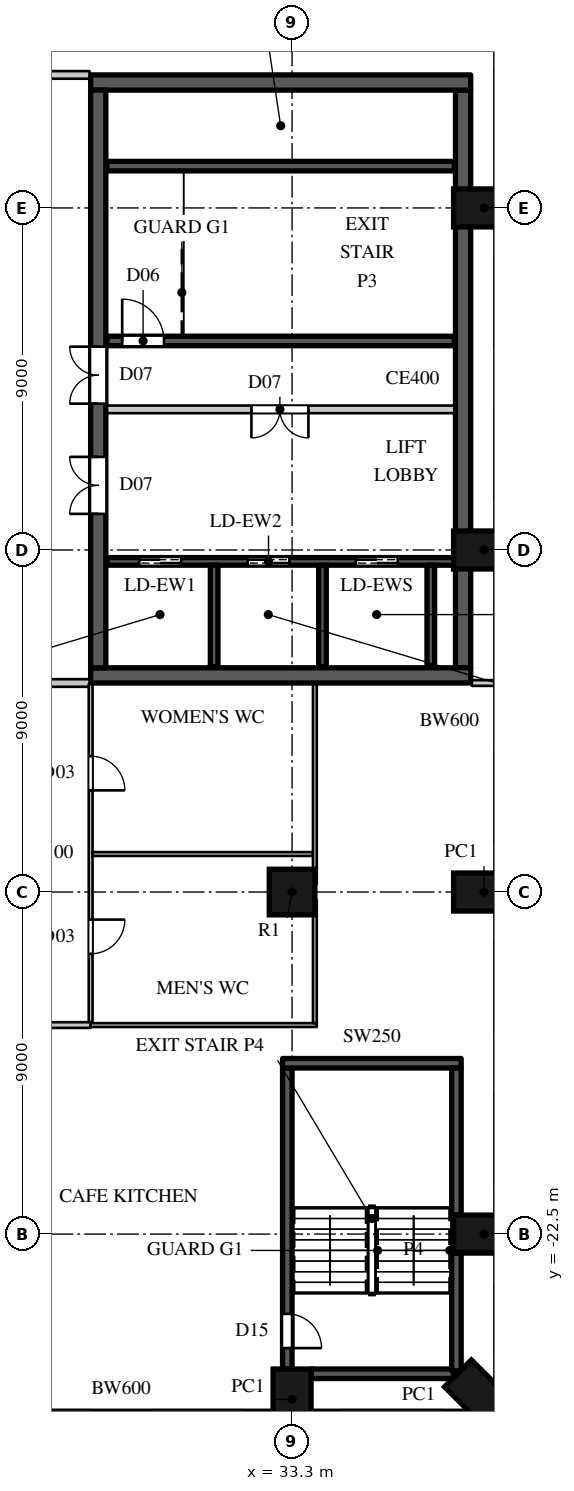
"""IFC4 building model, lengths in metres.
Left out: names, types, materials, properties, quantities, classifications, styles, units other than length and angle.
Written with IfcOpenShell. Run it as: python <this file> out.ifc"""

import sys

from ifc_helpers import new_model, si_unit, direction, frame, frame_2d, origin, origin_2d, place, context, subcontext, project, spatial, rectangle, circle, extrude, element, fill, save


model = new_model("IFC4")
c1 = context("Model", 3, precision=1e-05, world=origin(), true_north=direction((0.0, 1.0)))
c2 = subcontext(c1, "Body", "Model", "MODEL_VIEW")
j1 = project(units=[si_unit("LENGTHUNIT", "METRE"), si_unit("PLANEANGLEUNIT", "RADIAN")], contexts=[c1])
p1 = place(None, origin())
s1 = spatial("IfcSite", under=j1, at=p1, CompositionType="ELEMENT")
p2 = place(p1, origin())
s2 = spatial("IfcBuilding", under=s1, at=p2, CompositionType="ELEMENT")
p3 = place(p2, frame((0.0, 0.0, 44.0)))
s3 = spatial("IfcBuildingStorey", under=s2, at=p3, CompositionType="ELEMENT", Elevation=44.0)
for number, where, z_axis, x_axis in (
    (1, (33.3, -26.85, 0.0), (0.0, 0.0, 1.0), (1.0, 0.0, 0.0)),
    (2, (38.231, -26.731, 0.0), (0.0, 0.0, 1.0), (0.707, 0.707, 0.0)),
    (3, (38.35, -22.5, 0.0), (0.0, 0.0, 1.0), (0.0, 1.0, 0.0)),
    (4, (38.35, -13.5, 0.0), (0.0, 0.0, 1.0), (0.0, 1.0, 0.0)),
    (5, (38.35, -4.5, 0.0), (0.0, 0.0, 1.0), (0.0, 1.0, 0.0)),
    (6, (38.35, 4.5, 0.0), (0.0, 0.0, 1.0), (0.0, 1.0, 0.0)),
):
    element("IfcColumn", number, at=place(p3, frame(where, z_axis=z_axis, x_axis=x_axis)), inside=s3, PredefinedType="COLUMN", context=c2, shape_type="SweptSolid", body=[
        extrude(rectangle(XDim=1.0, YDim=1.6, at=origin_2d()), origin(), (0.0, 0.0, 1.0), 6.0),
    ])
p4 = place(p3, frame((33.3, -13.5, 0.0), z_axis=(0.0, 0.0, 1.0), x_axis=(1.0, 0.0, 0.0)))
e7 = element("IfcColumn", 7, at=p4, inside=s3, PredefinedType="COLUMN", context=c2, shape_type="SweptSolid", body=[
    extrude(circle(Radius=0.6, at=origin_2d()), origin(), (0.0, 0.0, 1.0), 6.0),
])
p5 = place(p3, frame((24.8, -27.425, 0.0), z_axis=(0.0, 0.0, 1.0), x_axis=(1.0, 0.0, 0.0)))
e8 = element("IfcWall", 8, at=p5, inside=s3, PredefinedType="ELEMENTEDWALL", context=c2, shape_type="SweptSolid", body=[
    extrude(rectangle(XDim=8.0, YDim=0.6, at=frame_2d((4.0, 0.0))), origin(), (0.0, 0.0, 1.0), 5.596),
])
p6 = place(p5, frame((0.8, 0.0, 1.2)))
e9 = element("IfcOpeningElement", 9, at=p6, cuts=e8, PredefinedType="OPENING", context=c2, shape_type="SweptSolid", body=[
    extrude(rectangle(XDim=2.4, YDim=2.4, at=frame_2d((1.2, 1.2))), frame((0.0, 0.31, 0.0), z_axis=(0.0, -1.0, 0.0), x_axis=(1.0, 0.0, 0.0)), (0.0, 0.0, 1.0), 0.62),
])
p7 = place(p5, frame((4.8, 0.0, 1.2)))
e10 = element("IfcOpeningElement", 10, at=p7, cuts=e8, PredefinedType="OPENING", context=c2, shape_type="SweptSolid", body=[
    extrude(rectangle(XDim=2.4, YDim=2.4, at=frame_2d((1.2, 1.2))), frame((0.0, 0.31, 0.0), z_axis=(0.0, -1.0, 0.0), x_axis=(1.0, 0.0, 0.0)), (0.0, 0.0, 1.0), 0.62),
])
p8 = place(p3, frame((33.8, -27.425, 0.0), z_axis=(0.0, 0.0, 1.0), x_axis=(1.0, 0.0, 0.0)))
e11 = element("IfcWall", 11, at=p8, inside=s3, PredefinedType="ELEMENTEDWALL", context=c2, shape_type="SweptSolid", body=[
    extrude(rectangle(XDim=4.193, YDim=0.6, at=frame_2d((2.096, 0.0))), origin(), (0.0, 0.0, 1.0), 5.596),
])
p9 = place(p8, frame((0.746, 0.0, 1.2)))
e12 = element("IfcOpeningElement", 12, at=p9, cuts=e11, PredefinedType="OPENING", context=c2, shape_type="SweptSolid", body=[
    extrude(rectangle(XDim=2.7, YDim=2.4, at=frame_2d((1.35, 1.2))), frame((0.0, 0.31, 0.0), z_axis=(0.0, -1.0, 0.0), x_axis=(1.0, 0.0, 0.0)), (0.0, 0.0, 1.0), 0.62),
])
for number, where, z_axis, x_axis in (
    (13, (28.0, 7.8, 0.0), (0.0, 0.0, 1.0), (1.0, 0.0, 0.0)),
    (14, (28.0, -7.8, 0.0), (0.0, 0.0, 1.0), (1.0, 0.0, 0.0)),
):
    element("IfcWall", number, at=place(p3, frame(where, z_axis=z_axis, x_axis=x_axis)), inside=s3, PredefinedType="SHEAR", context=c2, shape_type="SweptSolid", body=[
        extrude(rectangle(XDim=10.0, YDim=0.4, at=frame_2d((5.0, 0.0))), origin(), (0.0, 0.0, 1.0), 6.0),
    ])
p10 = place(p3, frame((37.8, -7.6, 0.0), z_axis=(0.0, 0.0, 1.0), x_axis=(0.0, 1.0, 0.0)))
e15 = element("IfcWall", 15, at=p10, inside=s3, PredefinedType="SHEAR", context=c2, shape_type="SweptSolid", body=[
    extrude(rectangle(XDim=15.2, YDim=0.4, at=frame_2d((7.6, 0.0))), origin(), (0.0, 0.0, 1.0), 6.0),
])
p11 = place(p3, frame((28.2, -7.6, 0.0), z_axis=(0.0, 0.0, 1.0), x_axis=(0.0, 1.0, 0.0)))
e16 = element("IfcWall", 16, at=p11, inside=s3, PredefinedType="SHEAR", context=c2, shape_type="SweptSolid", body=[
    extrude(rectangle(XDim=15.2, YDim=0.4, at=frame_2d((7.6, 0.0))), origin(), (0.0, 0.0, 1.0), 6.0),
])
p12 = place(p11, frame((4.05, 0.0, 0.0)))
e17 = element("IfcOpeningElement", 17, at=p12, cuts=e16, PredefinedType="OPENING", context=c2, shape_type="SweptSolid", body=[
    extrude(rectangle(XDim=1.5, YDim=2.4, at=frame_2d((0.75, 1.2))), frame((0.0, 0.21, 0.0), z_axis=(0.0, -1.0, 0.0), x_axis=(1.0, 0.0, 0.0)), (0.0, 0.0, 1.0), 0.42),
])
p13 = place(p11, frame((6.95, 0.0, 0.0)))
e18 = element("IfcOpeningElement", 18, at=p13, cuts=e16, PredefinedType="OPENING", context=c2, shape_type="SweptSolid", body=[
    extrude(rectangle(XDim=1.5, YDim=2.4, at=frame_2d((0.75, 1.2))), frame((0.0, 0.21, 0.0), z_axis=(0.0, -1.0, 0.0), x_axis=(1.0, 0.0, 0.0)), (0.0, 0.0, 1.0), 0.42),
])
p14 = place(p3, frame((14.4, -8.0, 0.0), z_axis=(0.0, 0.0, 1.0), x_axis=(1.0, 0.0, 0.0)))
e19 = element("IfcWall", 19, at=p14, inside=s3, PredefinedType="PARTITIONING", context=c2, shape_type="SweptSolid", body=[
    extrude(rectangle(XDim=13.57, YDim=0.2, at=frame_2d((6.785, 0.0))), origin(), (0.0, 0.0, 1.0), 5.596),
])
p15 = place(p14, frame((8.45, 0.0, 0.0)))
e20 = element("IfcOpeningElement", 20, at=p15, cuts=e19, PredefinedType="OPENING", context=c2, shape_type="SweptSolid", body=[
    extrude(rectangle(XDim=1.6, YDim=2.4, at=frame_2d((0.8, 1.2))), frame((0.0, 0.11, 0.0), z_axis=(0.0, -1.0, 0.0), x_axis=(1.0, 0.0, 0.0)), (0.0, 0.0, 1.0), 0.22),
])
p16 = place(p14, frame((0.3, 0.0, 0.0)))
e21 = element("IfcOpeningElement", 21, at=p16, cuts=e19, PredefinedType="OPENING", context=c2, shape_type="SweptSolid", body=[
    extrude(rectangle(XDim=1.6, YDim=2.4, at=frame_2d((0.8, 1.2))), frame((0.0, 0.11, 0.0), z_axis=(0.0, -1.0, 0.0), x_axis=(1.0, 0.0, 0.0)), (0.0, 0.0, 1.0), 0.22),
])
p17 = place(p3, frame((14.4, 8.0, 0.0), z_axis=(0.0, 0.0, 1.0), x_axis=(1.0, 0.0, 0.0)))
e22 = element("IfcWall", 22, at=p17, inside=s3, PredefinedType="PARTITIONING", context=c2, shape_type="SweptSolid", body=[
    extrude(rectangle(XDim=13.57, YDim=0.2, at=frame_2d((6.785, 0.0))), origin(), (0.0, 0.0, 1.0), 5.596),
])
p18 = place(p17, frame((0.3, 0.0, 0.0)))
e23 = element("IfcOpeningElement", 23, at=p18, cuts=e22, PredefinedType="OPENING", context=c2, shape_type="SweptSolid", body=[
    extrude(rectangle(XDim=1.6, YDim=2.4, at=frame_2d((0.8, 1.2))), frame((0.0, 0.11, 0.0), z_axis=(0.0, -1.0, 0.0), x_axis=(1.0, 0.0, 0.0)), (0.0, 0.0, 1.0), 0.22),
])
p19 = place(p17, frame((8.45, 0.0, 0.0)))
e24 = element("IfcOpeningElement", 24, at=p19, cuts=e22, PredefinedType="OPENING", context=c2, shape_type="SweptSolid", body=[
    extrude(rectangle(XDim=1.6, YDim=2.4, at=frame_2d((0.8, 1.2))), frame((0.0, 0.11, 0.0), z_axis=(0.0, -1.0, 0.0), x_axis=(1.0, 0.0, 0.0)), (0.0, 0.0, 1.0), 0.22),
])
p20 = place(p3, frame((28.43, -0.8, 0.0), z_axis=(0.0, 0.0, 1.0), x_axis=(1.0, 0.0, 0.0)))
e25 = element("IfcWall", 25, at=p20, inside=s3, PredefinedType="PARTITIONING", context=c2, shape_type="SweptSolid", body=[
    extrude(rectangle(XDim=9.14, YDim=0.2, at=frame_2d((4.57, 0.0))), origin(), (0.0, 0.0, 1.0), 5.596),
])
p21 = place(p20, frame((3.8, 0.0, 0.0)))
e26 = element("IfcOpeningElement", 26, at=p21, cuts=e25, PredefinedType="OPENING", context=c2, shape_type="SweptSolid", body=[
    extrude(rectangle(XDim=1.5, YDim=2.4, at=frame_2d((0.75, 1.2))), frame((0.0, 0.11, 0.0), z_axis=(0.0, -1.0, 0.0), x_axis=(1.0, 0.0, 0.0)), (0.0, 0.0, 1.0), 0.22),
])
p22 = place(p3, frame((15.711, -17.0, 0.0), z_axis=(0.0, 0.0, 1.0), x_axis=(1.0, 0.0, 0.0)))
e27 = element("IfcWall", 27, at=p22, inside=s3, PredefinedType="PARTITIONING", context=c2, shape_type="SweptSolid", body=[
    extrude(rectangle(XDim=12.289, YDim=0.15, at=frame_2d((6.145, 0.0))), origin(), (0.0, 0.0, 1.0), 5.596),
])
p23 = place(p22, frame((5.65, 0.0, 0.0)))
e28 = element("IfcOpeningElement", 28, at=p23, cuts=e27, PredefinedType="OPENING", context=c2, shape_type="SweptSolid", body=[
    extrude(rectangle(XDim=0.9, YDim=2.2, at=frame_2d((0.45, 1.1))), frame((0.0, 0.085, 0.0), z_axis=(0.0, -1.0, 0.0), x_axis=(1.0, 0.0, 0.0)), (0.0, 0.0, 1.0), 0.17),
])
p24 = place(p3, frame((38.03, -8.0, 0.0), z_axis=(0.0, 0.0, 1.0), x_axis=(1.0, 0.0, 0.0)))
e29 = element("IfcWall", 29, at=p24, inside=s3, PredefinedType="PARTITIONING", context=c2, shape_type="SweptSolid", body=[
    extrude(rectangle(XDim=0.595, YDim=0.15, at=frame_2d((0.297, 0.0))), origin(), (0.0, 0.0, 1.0), 5.596),
])
p25 = place(p3, frame((28.43, -4.8, 0.0), z_axis=(0.0, 0.0, 1.0), x_axis=(1.0, 0.0, 0.0)))
e30 = element("IfcWall", 30, at=p25, inside=s3, PredefinedType="SHEAR", context=c2, shape_type="SweptSolid", body=[
    extrude(rectangle(XDim=9.13, YDim=0.2, at=frame_2d((4.565, 0.0))), origin(), (0.0, 0.0, 1.0), 5.596),
])
p26 = place(p25, frame((0.85, 0.0, 0.0)))
e31 = element("IfcOpeningElement", 31, at=p26, cuts=e30, PredefinedType="OPENING", context=c2, shape_type="SweptSolid", body=[
    extrude(rectangle(XDim=1.1, YDim=2.2, at=frame_2d((0.55, 1.1))), frame((0.0, 0.11, 0.0), z_axis=(0.0, -1.0, 0.0), x_axis=(1.0, 0.0, 0.0)), (0.0, 0.0, 1.0), 0.22),
])
p27 = place(p25, frame((3.7, 0.0, 0.0)))
e32 = element("IfcOpeningElement", 32, at=p27, cuts=e30, PredefinedType="OPENING", context=c2, shape_type="SweptSolid", body=[
    extrude(rectangle(XDim=1.1, YDim=2.2, at=frame_2d((0.55, 1.1))), frame((0.0, 0.11, 0.0), z_axis=(0.0, -1.0, 0.0), x_axis=(1.0, 0.0, 0.0)), (0.0, 0.0, 1.0), 0.22),
])
p28 = place(p25, frame((6.55, 0.0, 0.0)))
e33 = element("IfcOpeningElement", 33, at=p28, cuts=e30, PredefinedType="OPENING", context=c2, shape_type="SweptSolid", body=[
    extrude(rectangle(XDim=1.1, YDim=2.2, at=frame_2d((0.55, 1.1))), frame((0.0, 0.11, 0.0), z_axis=(0.0, -1.0, 0.0), x_axis=(1.0, 0.0, 0.0)), (0.0, 0.0, 1.0), 0.22),
])
for number, where, z_axis, x_axis in (
    (34, (31.25, -7.57, 0.0), (0.0, 0.0, 1.0), (0.0, 1.0, 0.0)),
    (35, (34.1, -7.57, 0.0), (0.0, 0.0, 1.0), (0.0, 1.0, 0.0)),
    (36, (36.95, -7.57, 0.0), (0.0, 0.0, 1.0), (0.0, 1.0, 0.0)),
):
    element("IfcWall", number, at=place(p3, frame(where, z_axis=z_axis, x_axis=x_axis)), inside=s3, PredefinedType="SHEAR", context=c2, shape_type="SweptSolid", body=[
        extrude(rectangle(XDim=2.67, YDim=0.2, at=frame_2d((1.335, 0.0))), origin(), (0.0, 0.0, 1.0), 5.596),
    ])
p29 = place(p3, frame((28.43, 1.0, 0.0), z_axis=(0.0, 0.0, 1.0), x_axis=(1.0, 0.0, 0.0)))
e37 = element("IfcWall", 37, at=p29, inside=s3, PredefinedType="SHEAR", context=c2, shape_type="SweptSolid", body=[
    extrude(rectangle(XDim=9.14, YDim=0.25, at=frame_2d((4.57, 0.0))), origin(), (0.0, 0.0, 1.0), 5.596),
])
p30 = place(p29, frame((0.4, 0.0, 0.0)))
e38 = element("IfcOpeningElement", 38, at=p30, cuts=e37, PredefinedType="OPENING", context=c2, shape_type="SweptSolid", body=[
    extrude(rectangle(XDim=1.1, YDim=2.2, at=frame_2d((0.55, 1.1))), frame((0.0, 0.135, 0.0), z_axis=(0.0, -1.0, 0.0), x_axis=(1.0, 0.0, 0.0)), (0.0, 0.0, 1.0), 0.27),
])
p31 = place(p3, frame((28.43, 5.6, 0.0), z_axis=(0.0, 0.0, 1.0), x_axis=(1.0, 0.0, 0.0)))
e39 = element("IfcWall", 39, at=p31, inside=s3, PredefinedType="SHEAR", context=c2, shape_type="SweptSolid", body=[
    extrude(rectangle(XDim=9.14, YDim=0.25, at=frame_2d((4.57, 0.0))), origin(), (0.0, 0.0, 1.0), 5.596),
])
p32 = place(p3, frame((33.175, -26.05, 0.0), z_axis=(0.0, 0.0, 1.0), x_axis=(0.0, 1.0, 0.0)))
e40 = element("IfcWall", 40, at=p32, inside=s3, PredefinedType="SHEAR", context=c2, shape_type="SweptSolid", body=[
    extrude(rectangle(XDim=7.92, YDim=0.25, at=frame_2d((3.96, 0.0))), origin(), (0.0, 0.0, 1.0), 5.596),
])
p33 = place(p32, frame((0.55, 0.0, 0.0)))
e41 = element("IfcOpeningElement", 41, at=p33, cuts=e40, PredefinedType="OPENING", context=c2, shape_type="SweptSolid", body=[
    extrude(rectangle(XDim=0.9, YDim=2.2, at=frame_2d((0.45, 1.1))), frame((0.0, 0.135, 0.0), z_axis=(0.0, -1.0, 0.0), x_axis=(1.0, 0.0, 0.0)), (0.0, 0.0, 1.0), 0.27),
])
p34 = place(p3, frame((33.8, -26.175, 0.0), z_axis=(0.0, 0.0, 1.0), x_axis=(1.0, 0.0, 0.0)))
e42 = element("IfcWall", 42, at=p34, inside=s3, PredefinedType="SHEAR", context=c2, shape_type="SweptSolid", body=[
    extrude(rectangle(XDim=3.745, YDim=0.25, at=frame_2d((1.873, 0.0))), origin(), (0.0, 0.0, 1.0), 5.596),
])
p35 = place(p3, frame((33.05, -18.005, 0.0), z_axis=(0.0, 0.0, 1.0), x_axis=(1.0, 0.0, 0.0)))
e43 = element("IfcWall", 43, at=p35, inside=s3, PredefinedType="SHEAR", context=c2, shape_type="SweptSolid", body=[
    extrude(rectangle(XDim=4.7, YDim=0.25, at=frame_2d((2.35, 0.0))), origin(), (0.0, 0.0, 1.0), 5.596),
])
p36 = place(p3, frame((37.625, -26.095, 0.0), z_axis=(0.0, 0.0, 1.0), x_axis=(0.0, 1.0, 0.0)))
e44 = element("IfcWall", 44, at=p36, inside=s3, PredefinedType="SHEAR", context=c2, shape_type="SweptSolid", body=[
    extrude(rectangle(XDim=3.095, YDim=0.25, at=frame_2d((1.548, 0.0))), origin(), (0.0, 0.0, 1.0), 5.596),
])
p37 = place(p3, frame((37.625, -22.0, 0.0), z_axis=(0.0, 0.0, 1.0), x_axis=(0.0, 1.0, 0.0)))
e45 = element("IfcWall", 45, at=p37, inside=s3, PredefinedType="SHEAR", context=c2, shape_type="SweptSolid", body=[
    extrude(rectangle(XDim=3.87, YDim=0.25, at=frame_2d((1.935, 0.0))), origin(), (0.0, 0.0, 1.0), 5.596),
])
p38 = place(p3, frame((28.0, -17.0, 0.0), z_axis=(0.0, 0.0, 1.0), x_axis=(1.0, 0.0, 0.0)))
e46 = element("IfcWall", 46, at=p38, inside=s3, PredefinedType="PARTITIONING", context=c2, shape_type="SweptSolid", body=[
    extrude(rectangle(XDim=5.95, YDim=0.1, at=frame_2d((2.975, 0.0))), origin(), (0.0, 0.0, 1.0), 5.596),
])
p39 = place(p3, frame((28.0, -16.925, 0.0), z_axis=(0.0, 0.0, 1.0), x_axis=(0.0, 1.0, 0.0)))
e47 = element("IfcWall", 47, at=p39, inside=s3, PredefinedType="PARTITIONING", context=c2, shape_type="SweptSolid", body=[
    extrude(rectangle(XDim=8.895, YDim=0.1, at=frame_2d((4.448, 0.0))), origin(), (0.0, 0.0, 1.0), 5.596),
])
p40 = place(p39, frame((6.1, 0.0, 0.0)))
e48 = element("IfcOpeningElement", 48, at=p40, cuts=e47, PredefinedType="OPENING", context=c2, shape_type="SweptSolid", body=[
    extrude(rectangle(XDim=0.9, YDim=2.2, at=frame_2d((0.45, 1.1))), frame((0.0, 0.06, 0.0), z_axis=(0.0, -1.0, 0.0), x_axis=(1.0, 0.0, 0.0)), (0.0, 0.0, 1.0), 0.12),
])
p41 = place(p39, frame((1.8, 0.0, 0.0)))
e49 = element("IfcOpeningElement", 49, at=p41, cuts=e47, PredefinedType="OPENING", context=c2, shape_type="SweptSolid", body=[
    extrude(rectangle(XDim=0.9, YDim=2.2, at=frame_2d((0.45, 1.1))), frame((0.0, 0.06, 0.0), z_axis=(0.0, -1.0, 0.0), x_axis=(1.0, 0.0, 0.0)), (0.0, 0.0, 1.0), 0.12),
])
p42 = place(p3, frame((28.05, -12.5, 0.0), z_axis=(0.0, 0.0, 1.0), x_axis=(1.0, 0.0, 0.0)))
e50 = element("IfcWall", 50, at=p42, inside=s3, PredefinedType="PARTITIONING", context=c2, shape_type="SweptSolid", body=[
    extrude(rectangle(XDim=5.8, YDim=0.1, at=frame_2d((2.9, 0.0))), origin(), (0.0, 0.0, 1.0), 5.596),
])
p43 = place(p3, frame((33.9, -16.95, 0.0), z_axis=(0.0, 0.0, 1.0), x_axis=(0.0, 1.0, 0.0)))
e51 = element("IfcWall", 51, at=p43, inside=s3, PredefinedType="PARTITIONING", context=c2, shape_type="SweptSolid", body=[
    extrude(rectangle(XDim=3.24, YDim=0.1, at=frame_2d((1.62, 0.0))), origin(), (0.0, 0.0, 1.0), 5.596),
])
p44 = place(p3, frame((33.9, -13.29, 0.0), z_axis=(0.0, 0.0, 1.0), x_axis=(0.0, 1.0, 0.0)))
e52 = element("IfcWall", 52, at=p44, inside=s3, PredefinedType="PARTITIONING", context=c2, shape_type="SweptSolid", body=[
    extrude(rectangle(XDim=5.26, YDim=0.1, at=frame_2d((2.63, 0.0))), origin(), (0.0, 0.0, 1.0), 5.596),
])
p45 = place(p30, origin())
e53 = element("IfcDoor", 53, at=p45, inside=s3, OperationType="SINGLE_SWING_LEFT", PredefinedType="DOOR", context=c2, shape_type="SweptSolid", body=[
    extrude(rectangle(XDim=1.1, YDim=2.2, at=frame_2d((0.55, 1.1))), frame((0.0, 0.025, 0.0), z_axis=(0.0, -1.0, 0.0), x_axis=(1.0, 0.0, 0.0)), (0.0, 0.0, 1.0), 0.05),
])
fill(e38, e53)
p46 = place(p21, origin())
e54 = element("IfcDoor", 54, at=p46, inside=s3, OperationType="DOUBLE_DOOR_SINGLE_SWING", PredefinedType="DOOR", context=c2, shape_type="SweptSolid", body=[
    extrude(rectangle(XDim=1.5, YDim=2.4, at=frame_2d((0.75, 1.2))), frame((0.0, 0.025, 0.0), z_axis=(0.0, -1.0, 0.0), x_axis=(1.0, 0.0, 0.0)), (0.0, 0.0, 1.0), 0.05),
])
fill(e26, e54)
p47 = place(p26, origin())
e55 = element("IfcDoor", 55, at=p47, inside=s3, OperationType="DOUBLE_DOOR_SLIDING", PredefinedType="DOOR", context=c2, shape_type="SweptSolid", body=[
    extrude(rectangle(XDim=1.1, YDim=2.2, at=frame_2d((0.55, 1.1))), frame((0.0, 0.025, 0.0), z_axis=(0.0, -1.0, 0.0), x_axis=(1.0, 0.0, 0.0)), (0.0, 0.0, 1.0), 0.05),
])
fill(e31, e55)
p48 = place(p27, origin())
e56 = element("IfcDoor", 56, at=p48, inside=s3, OperationType="DOUBLE_DOOR_SLIDING", PredefinedType="DOOR", context=c2, shape_type="SweptSolid", body=[
    extrude(rectangle(XDim=1.1, YDim=2.2, at=frame_2d((0.55, 1.1))), frame((0.0, 0.025, 0.0), z_axis=(0.0, -1.0, 0.0), x_axis=(1.0, 0.0, 0.0)), (0.0, 0.0, 1.0), 0.05),
])
fill(e32, e56)
p49 = place(p28, origin())
e57 = element("IfcDoor", 57, at=p49, inside=s3, OperationType="DOUBLE_DOOR_SLIDING", PredefinedType="DOOR", context=c2, shape_type="SweptSolid", body=[
    extrude(rectangle(XDim=1.1, YDim=2.2, at=frame_2d((0.55, 1.1))), frame((0.0, 0.025, 0.0), z_axis=(0.0, -1.0, 0.0), x_axis=(1.0, 0.0, 0.0)), (0.0, 0.0, 1.0), 0.05),
])
fill(e33, e57)
p50 = place(p40, origin())
e58 = element("IfcDoor", 58, at=p50, inside=s3, OperationType="SINGLE_SWING_RIGHT", PredefinedType="DOOR", context=c2, shape_type="SweptSolid", body=[
    extrude(rectangle(XDim=0.9, YDim=2.2, at=frame_2d((0.45, 1.1))), frame((0.0, 0.025, 0.0), z_axis=(0.0, -1.0, 0.0), x_axis=(1.0, 0.0, 0.0)), (0.0, 0.0, 1.0), 0.05),
])
fill(e48, e58)
p51 = place(p41, origin())
e59 = element("IfcDoor", 59, at=p51, inside=s3, OperationType="SINGLE_SWING_LEFT", PredefinedType="DOOR", context=c2, shape_type="SweptSolid", body=[
    extrude(rectangle(XDim=0.9, YDim=2.2, at=frame_2d((0.45, 1.1))), frame((0.0, 0.025, 0.0), z_axis=(0.0, -1.0, 0.0), x_axis=(1.0, 0.0, 0.0)), (0.0, 0.0, 1.0), 0.05),
])
fill(e49, e59)
p52 = place(p12, origin())
e60 = element("IfcDoor", 60, at=p52, inside=s3, OperationType="DOUBLE_DOOR_SINGLE_SWING", PredefinedType="DOOR", context=c2, shape_type="SweptSolid", body=[
    extrude(rectangle(XDim=1.5, YDim=2.4, at=frame_2d((0.75, 1.2))), frame((0.0, 0.025, 0.0), z_axis=(0.0, -1.0, 0.0), x_axis=(1.0, 0.0, 0.0)), (0.0, 0.0, 1.0), 0.05),
])
fill(e17, e60)
p53 = place(p13, origin())
e61 = element("IfcDoor", 61, at=p53, inside=s3, OperationType="DOUBLE_DOOR_SINGLE_SWING", PredefinedType="DOOR", context=c2, shape_type="SweptSolid", body=[
    extrude(rectangle(XDim=1.5, YDim=2.4, at=frame_2d((0.75, 1.2))), frame((0.0, 0.025, 0.0), z_axis=(0.0, -1.0, 0.0), x_axis=(1.0, 0.0, 0.0)), (0.0, 0.0, 1.0), 0.05),
])
fill(e18, e61)
p54 = place(p33, origin())
e62 = element("IfcDoor", 62, at=p54, inside=s3, OperationType="SINGLE_SWING_RIGHT", PredefinedType="DOOR", context=c2, shape_type="SweptSolid", body=[
    extrude(rectangle(XDim=0.9, YDim=2.2, at=frame_2d((0.45, 1.1))), frame((0.0, 0.025, 0.0), z_axis=(0.0, -1.0, 0.0), x_axis=(1.0, 0.0, 0.0)), (0.0, 0.0, 1.0), 0.05),
])
fill(e41, e62)
save(model, sys.argv[1])
